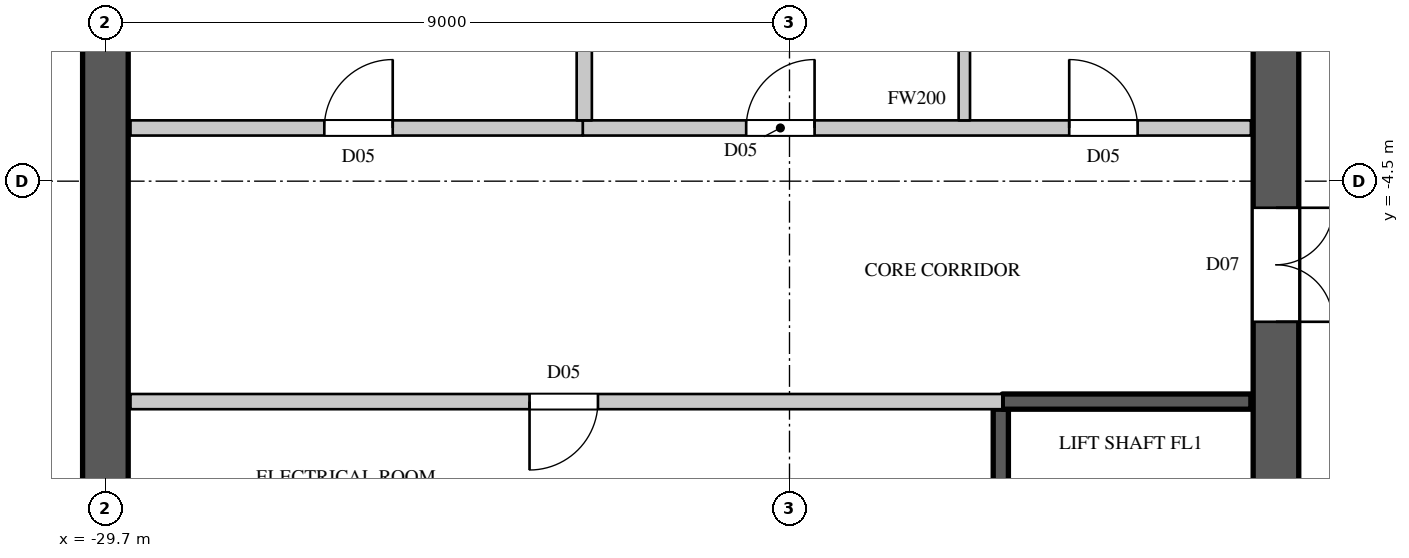
"""IFC4 building model, lengths in metres.
Left out: names, types, materials, properties, quantities, classifications, styles, units other than length and angle.
Written with IfcOpenShell. Run it as: python <this file> out.ifc"""

import sys

from ifc_helpers import new_model, si_unit, direction, frame, frame_2d, origin, place, context, subcontext, project, spatial, rectangle, extrude, element, fill, save


model = new_model("IFC4")
c1 = context("Model", 3, precision=1e-05, world=origin(), true_north=direction((0.0, 1.0)))
c2 = subcontext(c1, "Body", "Model", "MODEL_VIEW")
j1 = project(units=[si_unit("LENGTHUNIT", "METRE"), si_unit("PLANEANGLEUNIT", "RADIAN")], contexts=[c1])
p1 = place(None, origin())
s1 = spatial("IfcSite", under=j1, at=p1, CompositionType="ELEMENT")
p2 = place(p1, origin())
s2 = spatial("IfcBuilding", under=s1, at=p2, CompositionType="ELEMENT")
p3 = place(p2, frame((0.0, 0.0, 347.0)))
s3 = spatial("IfcBuildingStorey", under=s2, at=p3, CompositionType="ELEMENT", Elevation=347.0)
p4 = place(p3, frame((-14.3, -14.8, 0.0), z_axis=(0.0, 0.0, 1.0), x_axis=(0.0, 1.0, 0.0)))
e1 = element("IfcWall", 1, at=p4, inside=s3, PredefinedType="SHEAR", context=c2, shape_type="SweptSolid", body=[
    extrude(rectangle(XDim=29.6, YDim=0.6, at=frame_2d((14.8, 0.0))), origin(), (0.0, 0.0, 1.0), 4.0),
])
p5 = place(p4, frame((1.55, 0.0, 0.0)))
e2 = element("IfcOpeningElement", 2, at=p5, cuts=e1, PredefinedType="OPENING", context=c2, shape_type="SweptSolid", body=[
    extrude(rectangle(XDim=1.5, YDim=2.4, at=frame_2d((0.75, 1.2))), frame((0.0, 0.31, 0.0), z_axis=(0.0, -1.0, 0.0), x_axis=(1.0, 0.0, 0.0)), (0.0, 0.0, 1.0), 0.62),
])
p6 = place(p4, frame((26.55, 0.0, 0.0)))
e3 = element("IfcOpeningElement", 3, at=p6, cuts=e1, PredefinedType="OPENING", context=c2, shape_type="SweptSolid", body=[
    extrude(rectangle(XDim=1.5, YDim=2.4, at=frame_2d((0.75, 1.2))), frame((0.0, 0.31, 0.0), z_axis=(0.0, -1.0, 0.0), x_axis=(1.0, 0.0, 0.0)), (0.0, 0.0, 1.0), 0.62),
])
p7 = place(p4, frame((8.45, 0.0, 0.0)))
e4 = element("IfcOpeningElement", 4, at=p7, cuts=e1, PredefinedType="OPENING", context=c2, shape_type="SweptSolid", body=[
    extrude(rectangle(XDim=1.5, YDim=2.4, at=frame_2d((0.75, 1.2))), frame((0.0, 0.31, 0.0), z_axis=(0.0, -1.0, 0.0), x_axis=(1.0, 0.0, 0.0)), (0.0, 0.0, 1.0), 0.62),
])
p8 = place(p4, frame((19.65, 0.0, 0.0)))
e5 = element("IfcOpeningElement", 5, at=p8, cuts=e1, PredefinedType="OPENING", context=c2, shape_type="SweptSolid", body=[
    extrude(rectangle(XDim=1.5, YDim=2.4, at=frame_2d((0.75, 1.2))), frame((0.0, 0.31, 0.0), z_axis=(0.0, -1.0, 0.0), x_axis=(1.0, 0.0, 0.0)), (0.0, 0.0, 1.0), 0.62),
])
p9 = place(p4, frame((14.5, 0.0, 0.0)))
e6 = element("IfcOpeningElement", 6, at=p9, cuts=e1, PredefinedType="OPENING", context=c2, shape_type="SweptSolid", body=[
    extrude(rectangle(XDim=0.6, YDim=2.0, at=frame_2d((0.3, 1.0))), frame((0.0, 0.31, 0.0), z_axis=(0.0, -1.0, 0.0), x_axis=(1.0, 0.0, 0.0)), (0.0, 0.0, 1.0), 0.62),
])
p10 = place(p3, frame((-29.7, -10.2, 0.0), z_axis=(0.0, 0.0, 1.0), x_axis=(0.0, 1.0, 0.0)))
e7 = element("IfcWall", 7, at=p10, inside=s3, PredefinedType="SHEAR", context=c2, shape_type="SweptSolid", body=[
    extrude(rectangle(XDim=20.4, YDim=0.6, at=frame_2d((10.2, 0.0))), origin(), (0.0, 0.0, 1.0), 4.0),
])
p11 = place(p3, frame((-23.42, -3.8, 0.0), z_axis=(0.0, 0.0, 1.0), x_axis=(1.0, 0.0, 0.0)))
e8 = element("IfcWall", 8, at=p11, inside=s3, PredefinedType="PARTITIONING", context=c2, shape_type="SweptSolid", body=[
    extrude(rectangle(XDim=8.79, YDim=0.2, at=frame_2d((4.395, 0.0))), origin(), (0.0, 0.0, 1.0), 3.598),
])
p12 = place(p11, frame((2.15, 0.0, 0.0)))
e9 = element("IfcOpeningElement", 9, at=p12, cuts=e8, PredefinedType="OPENING", context=c2, shape_type="SweptSolid", body=[
    extrude(rectangle(XDim=0.9, YDim=2.2, at=frame_2d((0.45, 1.1))), frame((0.0, 0.11, 0.0), z_axis=(0.0, -1.0, 0.0), x_axis=(1.0, 0.0, 0.0)), (0.0, 0.0, 1.0), 0.22),
])
p13 = place(p11, frame((6.4, 0.0, 0.0)))
e10 = element("IfcOpeningElement", 10, at=p13, cuts=e8, PredefinedType="OPENING", context=c2, shape_type="SweptSolid", body=[
    extrude(rectangle(XDim=0.9, YDim=2.2, at=frame_2d((0.45, 1.1))), frame((0.0, 0.11, 0.0), z_axis=(0.0, -1.0, 0.0), x_axis=(1.0, 0.0, 0.0)), (0.0, 0.0, 1.0), 0.22),
])
p14 = place(p3, frame((-18.4, -3.7, 0.0), z_axis=(0.0, 0.0, 1.0), x_axis=(0.0, 1.0, 0.0)))
e11 = element("IfcWall", 11, at=p14, inside=s3, PredefinedType="PARTITIONING", context=c2, shape_type="SweptSolid", body=[
    extrude(rectangle(XDim=2.6, YDim=0.15, at=frame_2d((1.3, 0.0))), origin(), (0.0, 0.0, 1.0), 3.598),
])
p15 = place(p3, frame((-29.37, -7.4, 0.0), z_axis=(0.0, 0.0, 1.0), x_axis=(1.0, 0.0, 0.0)))
e12 = element("IfcWall", 12, at=p15, inside=s3, PredefinedType="PARTITIONING", context=c2, shape_type="SweptSolid", body=[
    extrude(rectangle(XDim=11.47, YDim=0.2, at=frame_2d((5.735, 0.0))), origin(), (0.0, 0.0, 1.0), 3.598),
])
p16 = place(p15, frame((5.25, 0.0, 0.0)))
e13 = element("IfcOpeningElement", 13, at=p16, cuts=e12, PredefinedType="OPENING", context=c2, shape_type="SweptSolid", body=[
    extrude(rectangle(XDim=0.9, YDim=2.2, at=frame_2d((0.45, 1.1))), frame((0.0, 0.11, 0.0), z_axis=(0.0, -1.0, 0.0), x_axis=(1.0, 0.0, 0.0)), (0.0, 0.0, 1.0), 0.22),
])
p17 = place(p3, frame((-29.37, -3.8, 0.0), z_axis=(0.0, 0.0, 1.0), x_axis=(1.0, 0.0, 0.0)))
e14 = element("IfcWall", 14, at=p17, inside=s3, PredefinedType="PARTITIONING", context=c2, shape_type="SweptSolid", body=[
    extrude(rectangle(XDim=5.95, YDim=0.2, at=frame_2d((2.975, 0.0))), origin(), (0.0, 0.0, 1.0), 3.598),
])
p18 = place(p17, frame((2.55, 0.0, 0.0)))
e15 = element("IfcOpeningElement", 15, at=p18, cuts=e14, PredefinedType="OPENING", context=c2, shape_type="SweptSolid", body=[
    extrude(rectangle(XDim=0.9, YDim=2.2, at=frame_2d((0.45, 1.1))), frame((0.0, 0.11, 0.0), z_axis=(0.0, -1.0, 0.0), x_axis=(1.0, 0.0, 0.0)), (0.0, 0.0, 1.0), 0.22),
])
p19 = place(p3, frame((-23.4, -3.7, 0.0), z_axis=(0.0, 0.0, 1.0), x_axis=(0.0, 1.0, 0.0)))
e16 = element("IfcWall", 16, at=p19, inside=s3, PredefinedType="PARTITIONING", context=c2, shape_type="SweptSolid", body=[
    extrude(rectangle(XDim=2.6, YDim=0.2, at=frame_2d((1.3, 0.0))), origin(), (0.0, 0.0, 1.0), 3.598),
])
p20 = place(p3, frame((-17.92, -10.1, 0.0), z_axis=(0.0, 0.0, 1.0), x_axis=(0.0, 1.0, 0.0)))
e17 = element("IfcWall", 17, at=p20, inside=s3, PredefinedType="SHEAR", context=c2, shape_type="SweptSolid", body=[
    extrude(rectangle(XDim=2.6, YDim=0.2, at=frame_2d((1.3, 0.0))), origin(), (0.0, 0.0, 1.0), 3.598),
])
p21 = place(p3, frame((-17.9, -7.4, 0.0), z_axis=(0.0, 0.0, 1.0), x_axis=(1.0, 0.0, 0.0)))
e18 = element("IfcWall", 18, at=p21, inside=s3, PredefinedType="SHEAR", context=c2, shape_type="SweptSolid", body=[
    extrude(rectangle(XDim=3.27, YDim=0.2, at=frame_2d((1.635, 0.0))), origin(), (0.0, 0.0, 1.0), 3.598),
])
p22 = place(p16, origin())
e19 = element("IfcDoor", 19, at=p22, inside=s3, OperationType="SINGLE_SWING_RIGHT", PredefinedType="DOOR", context=c2, shape_type="SweptSolid", body=[
    extrude(rectangle(XDim=0.9, YDim=2.2, at=frame_2d((0.45, 1.1))), frame((0.0, 0.025, 0.0), z_axis=(0.0, -1.0, 0.0), x_axis=(1.0, 0.0, 0.0)), (0.0, 0.0, 1.0), 0.05),
])
fill(e13, e19)
p23 = place(p18, origin())
e20 = element("IfcDoor", 20, at=p23, inside=s3, OperationType="SINGLE_SWING_RIGHT", PredefinedType="DOOR", context=c2, shape_type="SweptSolid", body=[
    extrude(rectangle(XDim=0.9, YDim=2.2, at=frame_2d((0.45, 1.1))), frame((0.0, 0.025, 0.0), z_axis=(0.0, -1.0, 0.0), x_axis=(1.0, 0.0, 0.0)), (0.0, 0.0, 1.0), 0.05),
])
fill(e15, e20)
p24 = place(p12, origin())
e21 = element("IfcDoor", 21, at=p24, inside=s3, OperationType="SINGLE_SWING_RIGHT", PredefinedType="DOOR", context=c2, shape_type="SweptSolid", body=[
    extrude(rectangle(XDim=0.9, YDim=2.2, at=frame_2d((0.45, 1.1))), frame((0.0, 0.025, 0.0), z_axis=(0.0, -1.0, 0.0), x_axis=(1.0, 0.0, 0.0)), (0.0, 0.0, 1.0), 0.05),
])
fill(e9, e21)
p25 = place(p13, origin())
e22 = element("IfcDoor", 22, at=p25, inside=s3, OperationType="SINGLE_SWING_LEFT", PredefinedType="DOOR", context=c2, shape_type="SweptSolid", body=[
    extrude(rectangle(XDim=0.9, YDim=2.2, at=frame_2d((0.45, 1.1))), frame((0.0, 0.025, 0.0), z_axis=(0.0, -1.0, 0.0), x_axis=(1.0, 0.0, 0.0)), (0.0, 0.0, 1.0), 0.05),
])
fill(e10, e22)
p26 = place(p7, origin())
e23 = element("IfcDoor", 23, at=p26, inside=s3, OperationType="DOUBLE_DOOR_SINGLE_SWING", PredefinedType="DOOR", context=c2, shape_type="SweptSolid", body=[
    extrude(rectangle(XDim=1.5, YDim=2.4, at=frame_2d((0.75, 1.2))), frame((0.0, -0.245, 0.0), z_axis=(0.0, -1.0, 0.0), x_axis=(1.0, 0.0, 0.0)), (0.0, 0.0, 1.0), 0.05),
])
fill(e4, e23)
save(model, sys.argv[1])
